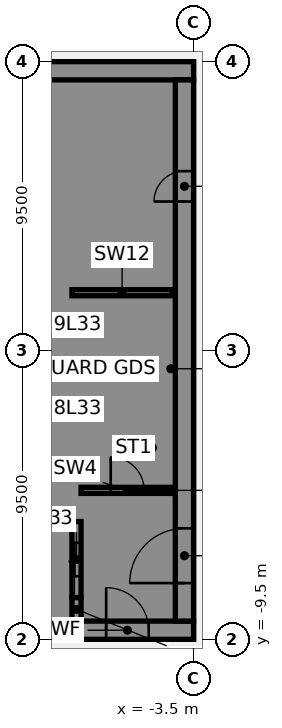
"""IFC4 building model, lengths in metres.
Left out: names, types, materials, properties, quantities, classifications, styles, units other than length and angle.
Written with IfcOpenShell. Run it as: python <this file> out.ifc"""

import sys

from ifc_helpers import new_model, si_unit, direction, frame, frame_2d, origin, place, context, subcontext, project, spatial, polyline, rectangle, outline, extrude, element, fill, save


model = new_model("IFC4")
c1 = context("Model", 3, precision=1e-05, world=origin(), true_north=direction((0.0, 1.0)))
c2 = subcontext(c1, "Body", "Model", "MODEL_VIEW")
j1 = project(units=[si_unit("LENGTHUNIT", "METRE"), si_unit("PLANEANGLEUNIT", "RADIAN")], contexts=[c1])
p1 = place(None, origin())
s1 = spatial("IfcSite", under=j1, at=p1, CompositionType="ELEMENT")
p2 = place(p1, origin())
s2 = spatial("IfcBuilding", under=s1, at=p2, CompositionType="ELEMENT")
p3 = place(p2, frame((0.0, 0.0, 136.75)))
s3 = spatial("IfcBuildingStorey", under=s2, at=p3, CompositionType="ELEMENT", Elevation=136.75)
p4 = place(p3, frame((-16.5, -9.2, 0.0), z_axis=(0.0, 0.0, 1.0), x_axis=(1.0, 0.0, 0.0)))
e1 = element("IfcWall", 1, at=p4, inside=s3, PredefinedType="SHEAR", context=c2, shape_type="SweptSolid", body=[
    extrude(rectangle(XDim=13.0, YDim=0.6, at=frame_2d((6.5, 0.0))), origin(), (0.0, 0.0, 1.0), 3.61),
])
p5 = place(p4, frame((4.15, 0.0, 0.0)))
e2 = element("IfcOpeningElement", 2, at=p5, cuts=e1, PredefinedType="OPENING", context=c2, shape_type="SweptSolid", body=[
    extrude(rectangle(XDim=1.4, YDim=2.1, at=frame_2d((0.7, 1.05))), frame((0.0, 0.31, 0.0), z_axis=(0.0, -1.0, 0.0), x_axis=(1.0, 0.0, 0.0)), (0.0, 0.0, 1.0), 0.62),
])
p6 = place(p4, frame((10.125, 0.0, 0.0)))
e3 = element("IfcOpeningElement", 3, at=p6, cuts=e1, PredefinedType="OPENING", context=c2, shape_type="SweptSolid", body=[
    extrude(rectangle(XDim=1.4, YDim=2.1, at=frame_2d((0.7, 1.05))), frame((0.0, 0.31, 0.0), z_axis=(0.0, -1.0, 0.0), x_axis=(1.0, 0.0, 0.0)), (0.0, 0.0, 1.0), 0.62),
])
p7 = place(p3, frame((-16.5, 9.2, 0.0), z_axis=(0.0, 0.0, 1.0), x_axis=(1.0, 0.0, 0.0)))
e4 = element("IfcWall", 4, at=p7, inside=s3, PredefinedType="SHEAR", context=c2, shape_type="SweptSolid", body=[
    extrude(rectangle(XDim=13.0, YDim=0.6, at=frame_2d((6.5, 0.0))), origin(), (0.0, 0.0, 1.0), 3.61),
])
p8 = place(p3, origin())
e5 = element("IfcWall", 5, at=p8, inside=s3, PredefinedType="SHEAR", context=c2, shape_type="SweptSolid", body=[
    extrude(outline(polyline([(-9.8, -5.375), (-9.8, -5.625), (-7.5, -5.625), (-7.2, -5.625), (-7.2, 8.9), (-7.5, 8.9), (-9.8, 8.9), (-9.8, 8.125), (-7.5, 8.125), (-7.5, 5.625), (-9.8, 5.625), (-9.8, 5.375), (-7.5, 5.375), (-7.5, 2.875), (-9.8, 2.875), (-9.8, 2.625), (-7.5, 2.625), (-7.5, 0.125), (-9.8, 0.125), (-9.8, -0.125), (-7.5, -0.125), (-7.5, -2.625), (-9.8, -2.625), (-9.8, -2.875), (-7.5, -2.875), (-7.5, -5.375), (-9.8, -5.375)])), origin(), (0.0, 0.0, 1.0), 3.61),
])
p9 = place(p3, origin())
e6 = element("IfcWall", 6, at=p9, inside=s3, PredefinedType="SHEAR", context=c2, shape_type="SweptSolid", body=[
    extrude(outline(polyline([(-7.5, -8.125), (-9.55, -8.125), (-9.55, -5.625), (-9.8, -5.625), (-9.8, -8.125), (-9.8, -8.9), (-7.5, -8.9), (-7.5, -8.125)])), origin(), (0.0, 0.0, 1.0), 3.61),
])
p10 = place(p3, frame((-7.35, -8.9, 0.0), z_axis=(0.0, 0.0, 1.0), x_axis=(0.0, 1.0, 0.0)))
e7 = element("IfcWall", 7, at=p10, inside=s3, PredefinedType="SHEAR", context=c2, shape_type="SweptSolid", body=[
    extrude(rectangle(XDim=0.775, YDim=0.3, at=frame_2d((0.387, 0.0))), origin(), (0.0, 0.0, 1.0), 3.61),
])
p11 = place(p3, frame((-7.5, 1.9, 0.0), z_axis=(0.0, 0.0, 1.0), x_axis=(1.0, 0.0, 0.0)))
e8 = element("IfcWall", 8, at=p11, inside=s3, PredefinedType="SHEAR", context=c2, shape_type="SweptSolid", body=[
    extrude(rectangle(XDim=3.3, YDim=0.2, at=frame_2d((1.65, 0.0))), origin(), (0.0, 0.0, 1.0), 3.61),
])
p12 = place(p3, frame((-7.35, -8.125, 0.0), z_axis=(0.0, 0.0, 1.0), x_axis=(0.0, 1.0, 0.0)))
e9 = element("IfcWall", 9, at=p12, inside=s3, PredefinedType="SHEAR", context=c2, shape_type="SweptSolid", body=[
    extrude(rectangle(XDim=2.5, YDim=0.3, at=frame_2d((1.25, 0.0))), origin(), (0.0, 0.0, 1.0), 3.61),
])
p13 = place(p12, frame((0.7, 0.0, 0.0)))
e10 = element("IfcOpeningElement", 10, at=p13, cuts=e9, PredefinedType="OPENING", context=c2, shape_type="SweptSolid", body=[
    extrude(rectangle(XDim=1.1, YDim=2.1, at=frame_2d((0.55, 1.05))), frame((0.0, 0.16, 0.0), z_axis=(0.0, -1.0, 0.0), x_axis=(1.0, 0.0, 0.0)), (0.0, 0.0, 1.0), 0.32),
])
p14 = place(p3, frame((-3.8, -8.9, 0.0), z_axis=(0.0, 0.0, 1.0), x_axis=(0.0, 1.0, 0.0)))
e11 = element("IfcWall", 11, at=p14, inside=s3, PredefinedType="SHEAR", context=c2, shape_type="SweptSolid", body=[
    extrude(rectangle(XDim=17.8, YDim=0.6, at=frame_2d((8.9, 0.0))), origin(), (0.0, 0.0, 1.0), 3.61),
])
p15 = place(p14, frame((1.25, 0.0, 0.0)))
e12 = element("IfcOpeningElement", 12, at=p15, cuts=e11, PredefinedType="OPENING", context=c2, shape_type="SweptSolid", body=[
    extrude(rectangle(XDim=1.8, YDim=2.1, at=frame_2d((0.9, 1.05))), frame((0.0, 0.31, 0.0), z_axis=(0.0, -1.0, 0.0), x_axis=(1.0, 0.0, 0.0)), (0.0, 0.0, 1.0), 0.62),
])
p16 = place(p14, frame((13.8, 0.0, 0.0)))
e13 = element("IfcOpeningElement", 13, at=p16, cuts=e11, PredefinedType="OPENING", context=c2, shape_type="SweptSolid", body=[
    extrude(rectangle(XDim=1.0, YDim=2.1, at=frame_2d((0.5, 1.05))), frame((0.0, 0.31, 0.0), z_axis=(0.0, -1.0, 0.0), x_axis=(1.0, 0.0, 0.0)), (0.0, 0.0, 1.0), 0.62),
])
p17 = place(p3, frame((-7.2, -4.6, 0.0), z_axis=(0.0, 0.0, 1.0), x_axis=(1.0, 0.0, 0.0)))
e14 = element("IfcWall", 14, at=p17, inside=s3, PredefinedType="SHEAR", context=c2, shape_type="SweptSolid", body=[
    extrude(rectangle(XDim=3.1, YDim=0.2, at=frame_2d((1.55, 0.0))), origin(), (0.0, 0.0, 1.0), 3.61),
])
p18 = place(p17, frame((0.975, 0.0, 0.0)))
e15 = element("IfcOpeningElement", 15, at=p18, cuts=e14, PredefinedType="OPENING", context=c2, shape_type="SweptSolid", body=[
    extrude(rectangle(XDim=1.1, YDim=2.1, at=frame_2d((0.55, 1.05))), frame((0.0, 0.11, 0.0), z_axis=(0.0, -1.0, 0.0), x_axis=(1.0, 0.0, 0.0)), (0.0, 0.0, 1.0), 0.22),
])
p19 = place(p6, origin())
e16 = element("IfcDoor", 16, at=p19, inside=s3, OperationType="SINGLE_SWING_LEFT", PredefinedType="DOOR", context=c2, shape_type="SweptSolid", body=[
    extrude(rectangle(XDim=1.4, YDim=2.1, at=frame_2d((0.7, 1.05))), frame((0.0, 0.025, 0.0), z_axis=(0.0, -1.0, 0.0), x_axis=(1.0, 0.0, 0.0)), (0.0, 0.0, 1.0), 0.05),
])
fill(e3, e16)
p20 = place(p15, origin())
e17 = element("IfcDoor", 17, at=p20, inside=s3, OperationType="SINGLE_SWING_LEFT", PredefinedType="DOOR", context=c2, shape_type="SweptSolid", body=[
    extrude(rectangle(XDim=1.8, YDim=2.1, at=frame_2d((0.9, 1.05))), frame((0.0, 0.025, 0.0), z_axis=(0.0, -1.0, 0.0), x_axis=(1.0, 0.0, 0.0)), (0.0, 0.0, 1.0), 0.05),
])
fill(e12, e17)
p21 = place(p16, origin())
e18 = element("IfcDoor", 18, at=p21, inside=s3, OperationType="SINGLE_SWING_LEFT", PredefinedType="DOOR", context=c2, shape_type="SweptSolid", body=[
    extrude(rectangle(XDim=1.0, YDim=2.1, at=frame_2d((0.5, 1.05))), frame((0.0, 0.025, 0.0), z_axis=(0.0, -1.0, 0.0), x_axis=(1.0, 0.0, 0.0)), (0.0, 0.0, 1.0), 0.05),
])
fill(e13, e18)
p22 = place(p18, origin())
e19 = element("IfcDoor", 19, at=p22, inside=s3, OperationType="SINGLE_SWING_LEFT", PredefinedType="DOOR", context=c2, shape_type="SweptSolid", body=[
    extrude(rectangle(XDim=1.1, YDim=2.1, at=frame_2d((0.55, 1.05))), frame((0.0, 0.025, 0.0), z_axis=(0.0, -1.0, 0.0), x_axis=(1.0, 0.0, 0.0)), (0.0, 0.0, 1.0), 0.05),
])
fill(e15, e19)
p23 = place(p13, origin())
e20 = element("IfcDoor", 20, at=p23, inside=s3, OperationType="SLIDING_TO_LEFT", PredefinedType="DOOR", context=c2, shape_type="SweptSolid", body=[
    extrude(rectangle(XDim=1.1, YDim=2.1, at=frame_2d((0.55, 1.05))), frame((0.0, 0.025, 0.0), z_axis=(0.0, -1.0, 0.0), x_axis=(1.0, 0.0, 0.0)), (0.0, 0.0, 1.0), 0.05),
])
fill(e10, e20)
save(model, sys.argv[1])
